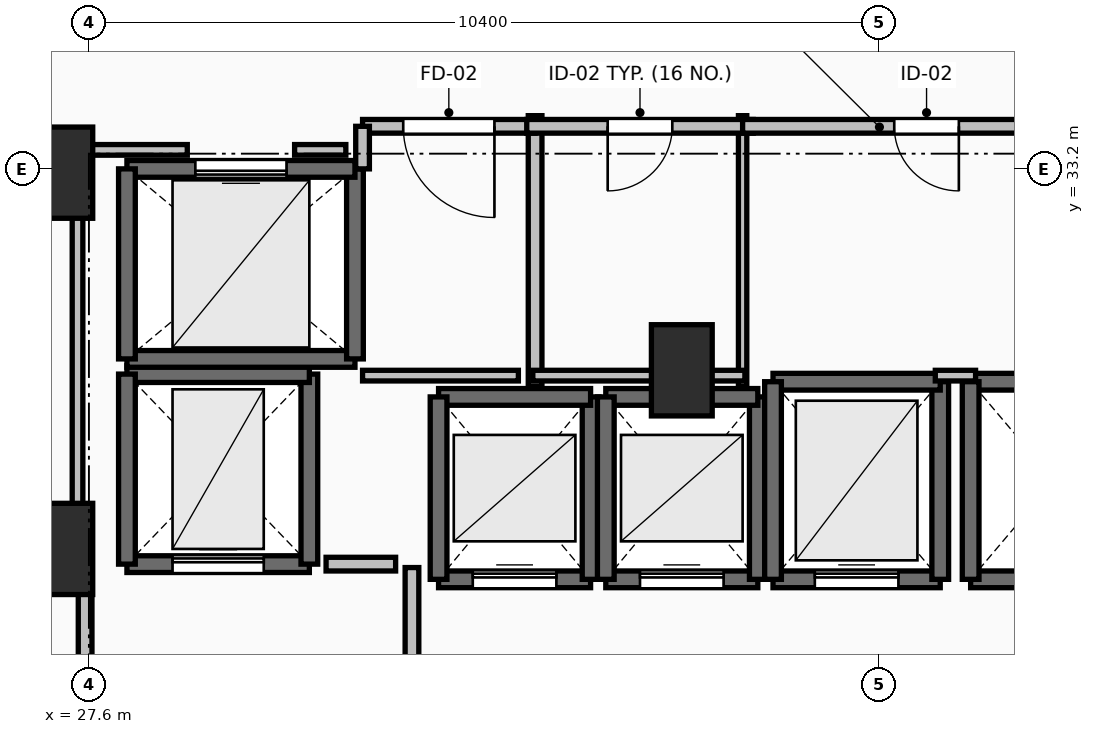
"""IFC4 building model, lengths in metres.
Left out: names, types, materials, properties, quantities, classifications, styles, units other than length and angle.
Written with IfcOpenShell. Run it as: python <this file> out.ifc"""

import sys

from ifc_helpers import new_model, si_unit, direction, frame, frame_2d, origin, origin_2d, place, context, subcontext, project, spatial, rectangle, extrude, element, fill, save


model = new_model("IFC4")
c1 = context("Model", 3, precision=1e-05, world=origin(), true_north=direction((0.0, 1.0)))
c2 = subcontext(c1, "Body", "Model", "MODEL_VIEW")
j1 = project(units=[si_unit("LENGTHUNIT", "METRE"), si_unit("PLANEANGLEUNIT", "RADIAN")], contexts=[c1])
p1 = place(None, origin())
s1 = spatial("IfcSite", under=j1, at=p1, CompositionType="ELEMENT")
p2 = place(p1, origin())
s2 = spatial("IfcBuilding", under=s1, at=p2, CompositionType="ELEMENT")
p3 = place(p2, frame((0.0, 0.0, 89.3)))
s3 = spatial("IfcBuildingStorey", under=s2, at=p3, CompositionType="ELEMENT", Elevation=89.3)
for number, where, z_axis, x_axis in (
    (1, (27.25, 28.2, 0.0), (0.0, 0.0, 1.0), (1.0, 0.0, 0.0)),
    (2, (27.25, 33.15, 0.0), (0.0, 0.0, 1.0), (1.0, 0.0, 0.0)),
    (3, (35.4, 30.55, 0.0), (0.0, 0.0, 1.0), (1.0, 0.0, 0.0)),
):
    element("IfcColumn", number, at=place(p3, frame(where, z_axis=z_axis, x_axis=x_axis)), inside=s3, PredefinedType="PILASTER", context=c2, shape_type="SweptSolid", body=[
        extrude(rectangle(XDim=0.8, YDim=1.2, at=origin_2d()), origin(), (0.0, 0.0, 1.0), 3.5),
    ])
p4 = place(p3, frame((32.2, 27.8, 0.0), z_axis=(0.0, 0.0, 1.0), x_axis=(1.0, 0.0, 0.0)))
e4 = element("IfcWall", 4, at=p4, inside=s3, PredefinedType="SOLIDWALL", context=c2, shape_type="SweptSolid", body=[
    extrude(rectangle(XDim=2.0, YDim=0.22, at=frame_2d((1.0, 0.0))), origin(), (0.0, 0.0, 1.0), 3.24),
])
p5 = place(p4, frame((0.45, 0.0, 0.0)))
e5 = element("IfcOpeningElement", 5, at=p5, cuts=e4, PredefinedType="OPENING", context=c2, shape_type="SweptSolid", body=[
    extrude(rectangle(XDim=1.1, YDim=2.2, at=frame_2d((0.55, 1.1))), frame((0.0, 0.125, 0.0), z_axis=(0.0, -1.0, 0.0), x_axis=(1.0, 0.0, 0.0)), (0.0, 0.0, 1.0), 0.25),
])
p6 = place(p3, frame((34.2, 27.8, 0.0), z_axis=(0.0, 0.0, 1.0), x_axis=(0.0, 1.0, 0.0)))
e6 = element("IfcWall", 6, at=p6, inside=s3, PredefinedType="SOLIDWALL", context=c2, shape_type="SweptSolid", body=[
    extrude(rectangle(XDim=2.4, YDim=0.22, at=frame_2d((1.2, 0.0))), origin(), (0.0, 0.0, 1.0), 3.24),
])
p7 = place(p3, frame((34.2, 30.2, 0.0), z_axis=(0.0, 0.0, 1.0), x_axis=(-1.0, 0.0, 0.0)))
e7 = element("IfcWall", 7, at=p7, inside=s3, PredefinedType="SOLIDWALL", context=c2, shape_type="SweptSolid", body=[
    extrude(rectangle(XDim=2.0, YDim=0.22, at=frame_2d((1.0, 0.0))), origin(), (0.0, 0.0, 1.0), 3.24),
])
p8 = place(p3, frame((32.2, 30.2, 0.0), z_axis=(0.0, 0.0, 1.0), x_axis=(0.0, -1.0, 0.0)))
e8 = element("IfcWall", 8, at=p8, inside=s3, PredefinedType="SOLIDWALL", context=c2, shape_type="SweptSolid", body=[
    extrude(rectangle(XDim=2.4, YDim=0.22, at=frame_2d((1.2, 0.0))), origin(), (0.0, 0.0, 1.0), 3.24),
])
p9 = place(p3, frame((34.4, 27.8, 0.0), z_axis=(0.0, 0.0, 1.0), x_axis=(1.0, 0.0, 0.0)))
e9 = element("IfcWall", 9, at=p9, inside=s3, PredefinedType="SOLIDWALL", context=c2, shape_type="SweptSolid", body=[
    extrude(rectangle(XDim=2.0, YDim=0.22, at=frame_2d((1.0, 0.0))), origin(), (0.0, 0.0, 1.0), 3.24),
])
p10 = place(p9, frame((0.45, 0.0, 0.0)))
e10 = element("IfcOpeningElement", 10, at=p10, cuts=e9, PredefinedType="OPENING", context=c2, shape_type="SweptSolid", body=[
    extrude(rectangle(XDim=1.1, YDim=2.2, at=frame_2d((0.55, 1.1))), frame((0.0, 0.125, 0.0), z_axis=(0.0, -1.0, 0.0), x_axis=(1.0, 0.0, 0.0)), (0.0, 0.0, 1.0), 0.25),
])
p11 = place(p3, frame((36.4, 27.8, 0.0), z_axis=(0.0, 0.0, 1.0), x_axis=(0.0, 1.0, 0.0)))
e11 = element("IfcWall", 11, at=p11, inside=s3, PredefinedType="SOLIDWALL", context=c2, shape_type="SweptSolid", body=[
    extrude(rectangle(XDim=2.4, YDim=0.22, at=frame_2d((1.2, 0.0))), origin(), (0.0, 0.0, 1.0), 3.24),
])
p12 = place(p3, frame((36.4, 30.2, 0.0), z_axis=(0.0, 0.0, 1.0), x_axis=(-1.0, 0.0, 0.0)))
e12 = element("IfcWall", 12, at=p12, inside=s3, PredefinedType="SOLIDWALL", context=c2, shape_type="SweptSolid", body=[
    extrude(rectangle(XDim=2.0, YDim=0.22, at=frame_2d((1.0, 0.0))), origin(), (0.0, 0.0, 1.0), 3.24),
])
p13 = place(p3, frame((34.4, 30.2, 0.0), z_axis=(0.0, 0.0, 1.0), x_axis=(0.0, -1.0, 0.0)))
e13 = element("IfcWall", 13, at=p13, inside=s3, PredefinedType="SOLIDWALL", context=c2, shape_type="SweptSolid", body=[
    extrude(rectangle(XDim=2.4, YDim=0.22, at=frame_2d((1.2, 0.0))), origin(), (0.0, 0.0, 1.0), 3.24),
])
p14 = place(p3, frame((36.6, 27.8, 0.0), z_axis=(0.0, 0.0, 1.0), x_axis=(1.0, 0.0, 0.0)))
e14 = element("IfcWall", 14, at=p14, inside=s3, PredefinedType="SOLIDWALL", context=c2, shape_type="SweptSolid", body=[
    extrude(rectangle(XDim=2.2, YDim=0.22, at=frame_2d((1.1, 0.0))), origin(), (0.0, 0.0, 1.0), 3.24),
])
p15 = place(p14, frame((0.55, 0.0, 0.0)))
e15 = element("IfcOpeningElement", 15, at=p15, cuts=e14, PredefinedType="OPENING", context=c2, shape_type="SweptSolid", body=[
    extrude(rectangle(XDim=1.1, YDim=2.2, at=frame_2d((0.55, 1.1))), frame((0.0, 0.125, 0.0), z_axis=(0.0, -1.0, 0.0), x_axis=(1.0, 0.0, 0.0)), (0.0, 0.0, 1.0), 0.25),
])
p16 = place(p3, frame((38.8, 27.8, 0.0), z_axis=(0.0, 0.0, 1.0), x_axis=(0.0, 1.0, 0.0)))
e16 = element("IfcWall", 16, at=p16, inside=s3, PredefinedType="SOLIDWALL", context=c2, shape_type="SweptSolid", body=[
    extrude(rectangle(XDim=2.6, YDim=0.22, at=frame_2d((1.3, 0.0))), origin(), (0.0, 0.0, 1.0), 3.24),
])
p17 = place(p3, frame((38.8, 30.4, 0.0), z_axis=(0.0, 0.0, 1.0), x_axis=(-1.0, 0.0, 0.0)))
e17 = element("IfcWall", 17, at=p17, inside=s3, PredefinedType="SOLIDWALL", context=c2, shape_type="SweptSolid", body=[
    extrude(rectangle(XDim=2.2, YDim=0.22, at=frame_2d((1.1, 0.0))), origin(), (0.0, 0.0, 1.0), 3.24),
])
p18 = place(p3, frame((36.6, 30.4, 0.0), z_axis=(0.0, 0.0, 1.0), x_axis=(0.0, -1.0, 0.0)))
e18 = element("IfcWall", 18, at=p18, inside=s3, PredefinedType="SOLIDWALL", context=c2, shape_type="SweptSolid", body=[
    extrude(rectangle(XDim=2.6, YDim=0.22, at=frame_2d((1.3, 0.0))), origin(), (0.0, 0.0, 1.0), 3.24),
])
for number, where, z_axis, x_axis in (
    (19, (39.2, 27.8, 0.0), (0.0, 0.0, 1.0), (1.0, 0.0, 0.0)),
    (20, (41.4, 30.4, 0.0), (0.0, 0.0, 1.0), (-1.0, 0.0, 0.0)),
):
    element("IfcWall", number, at=place(p3, frame(where, z_axis=z_axis, x_axis=x_axis)), inside=s3, PredefinedType="SOLIDWALL", context=c2, shape_type="SweptSolid", body=[
        extrude(rectangle(XDim=2.2, YDim=0.22, at=frame_2d((1.1, 0.0))), origin(), (0.0, 0.0, 1.0), 3.24),
    ])
p19 = place(p3, frame((39.2, 30.4, 0.0), z_axis=(0.0, 0.0, 1.0), x_axis=(0.0, -1.0, 0.0)))
e21 = element("IfcWall", 21, at=p19, inside=s3, PredefinedType="SOLIDWALL", context=c2, shape_type="SweptSolid", body=[
    extrude(rectangle(XDim=2.6, YDim=0.22, at=frame_2d((1.3, 0.0))), origin(), (0.0, 0.0, 1.0), 3.24),
])
p20 = place(p3, frame((28.1, 28.0, 0.0), z_axis=(0.0, 0.0, 1.0), x_axis=(1.0, 0.0, 0.0)))
e22 = element("IfcWall", 22, at=p20, inside=s3, PredefinedType="SHEAR", context=c2, shape_type="SweptSolid", body=[
    extrude(rectangle(XDim=2.4, YDim=0.22, at=frame_2d((1.2, 0.0))), origin(), (0.0, 0.0, 1.0), 3.24),
])
p21 = place(p20, frame((0.6, 0.0, 0.0)))
e23 = element("IfcOpeningElement", 23, at=p21, cuts=e22, PredefinedType="OPENING", context=c2, shape_type="SweptSolid", body=[
    extrude(rectangle(XDim=1.2, YDim=2.2, at=frame_2d((0.6, 1.1))), frame((0.0, 0.125, 0.0), z_axis=(0.0, -1.0, 0.0), x_axis=(1.0, 0.0, 0.0)), (0.0, 0.0, 1.0), 0.25),
])
p22 = place(p3, frame((30.5, 28.0, 0.0), z_axis=(0.0, 0.0, 1.0), x_axis=(0.0, 1.0, 0.0)))
e24 = element("IfcWall", 24, at=p22, inside=s3, PredefinedType="SHEAR", context=c2, shape_type="SweptSolid", body=[
    extrude(rectangle(XDim=2.5, YDim=0.22, at=frame_2d((1.25, 0.0))), origin(), (0.0, 0.0, 1.0), 3.24),
])
p23 = place(p3, frame((30.5, 30.5, 0.0), z_axis=(0.0, 0.0, 1.0), x_axis=(-1.0, 0.0, 0.0)))
e25 = element("IfcWall", 25, at=p23, inside=s3, PredefinedType="SHEAR", context=c2, shape_type="SweptSolid", body=[
    extrude(rectangle(XDim=2.4, YDim=0.22, at=frame_2d((1.2, 0.0))), origin(), (0.0, 0.0, 1.0), 3.24),
])
p24 = place(p3, frame((28.1, 30.5, 0.0), z_axis=(0.0, 0.0, 1.0), x_axis=(0.0, -1.0, 0.0)))
e26 = element("IfcWall", 26, at=p24, inside=s3, PredefinedType="SHEAR", context=c2, shape_type="SweptSolid", body=[
    extrude(rectangle(XDim=2.5, YDim=0.22, at=frame_2d((1.25, 0.0))), origin(), (0.0, 0.0, 1.0), 3.24),
])
p25 = place(p3, frame((28.1, 30.7, 0.0), z_axis=(0.0, 0.0, 1.0), x_axis=(1.0, 0.0, 0.0)))
e27 = element("IfcWall", 27, at=p25, inside=s3, PredefinedType="SOLIDWALL", context=c2, shape_type="SweptSolid", body=[
    extrude(rectangle(XDim=3.0, YDim=0.22, at=frame_2d((1.5, 0.0))), origin(), (0.0, 0.0, 1.0), 3.24),
])
p26 = place(p3, frame((31.1, 30.7, 0.0), z_axis=(0.0, 0.0, 1.0), x_axis=(0.0, 1.0, 0.0)))
e28 = element("IfcWall", 28, at=p26, inside=s3, PredefinedType="SOLIDWALL", context=c2, shape_type="SweptSolid", body=[
    extrude(rectangle(XDim=2.5, YDim=0.22, at=frame_2d((1.25, 0.0))), origin(), (0.0, 0.0, 1.0), 3.24),
])
p27 = place(p3, frame((31.1, 33.2, 0.0), z_axis=(0.0, 0.0, 1.0), x_axis=(-1.0, 0.0, 0.0)))
e29 = element("IfcWall", 29, at=p27, inside=s3, PredefinedType="SOLIDWALL", context=c2, shape_type="SweptSolid", body=[
    extrude(rectangle(XDim=3.0, YDim=0.22, at=frame_2d((1.5, 0.0))), origin(), (0.0, 0.0, 1.0), 3.24),
])
p28 = place(p27, frame((0.9, 0.0, 0.0)))
e30 = element("IfcOpeningElement", 30, at=p28, cuts=e29, PredefinedType="OPENING", context=c2, shape_type="SweptSolid", body=[
    extrude(rectangle(XDim=1.2, YDim=2.2, at=frame_2d((0.6, 1.1))), frame((0.0, 0.125, 0.0), z_axis=(0.0, -1.0, 0.0), x_axis=(1.0, 0.0, 0.0)), (0.0, 0.0, 1.0), 0.25),
])
p29 = place(p3, frame((28.1, 33.2, 0.0), z_axis=(0.0, 0.0, 1.0), x_axis=(0.0, -1.0, 0.0)))
e31 = element("IfcWall", 31, at=p29, inside=s3, PredefinedType="SOLIDWALL", context=c2, shape_type="SweptSolid", body=[
    extrude(rectangle(XDim=2.5, YDim=0.22, at=frame_2d((1.25, 0.0))), origin(), (0.0, 0.0, 1.0), 3.24),
])
p30 = place(p3, frame((31.85, 24.045, 0.0), z_axis=(0.0, 0.0, 1.0), x_axis=(0.0, 1.0, 0.0)))
e32 = element("IfcWall", 32, at=p30, inside=s3, PredefinedType="PARTITIONING", context=c2, shape_type="SweptSolid", body=[
    extrude(rectangle(XDim=3.91, YDim=0.18, at=frame_2d((1.955, 0.0))), origin(), (0.0, 0.0, 1.0), 3.24),
])
p31 = place(p30, frame((1.355, 0.0, 0.0)))
e33 = element("IfcOpeningElement", 33, at=p31, cuts=e32, PredefinedType="OPENING", context=c2, shape_type="SweptSolid", body=[
    extrude(rectangle(XDim=1.2, YDim=2.15, at=frame_2d((0.6, 1.075))), frame((0.0, 0.105, 0.0), z_axis=(0.0, -1.0, 0.0), x_axis=(1.0, 0.0, 0.0)), (0.0, 0.0, 1.0), 0.21),
])
p32 = place(p3, frame((27.55, 28.0, 0.0), z_axis=(0.0, 0.0, 1.0), x_axis=(0.0, -1.0, 0.0)))
e34 = element("IfcWall", 34, at=p32, inside=s3, PredefinedType="PARTITIONING", context=c2, shape_type="SweptSolid", body=[
    extrude(rectangle(XDim=4.05, YDim=0.18, at=frame_2d((2.025, 0.0))), origin(), (0.0, 0.0, 1.0), 3.24),
])
p33 = place(p32, frame((1.425, 0.0, 0.0)))
e35 = element("IfcOpeningElement", 35, at=p33, cuts=e34, PredefinedType="OPENING", context=c2, shape_type="SweptSolid", body=[
    extrude(rectangle(XDim=1.2, YDim=2.15, at=frame_2d((0.6, 1.075))), frame((0.0, 0.105, 0.0), z_axis=(0.0, -1.0, 0.0), x_axis=(1.0, 0.0, 0.0)), (0.0, 0.0, 1.0), 0.21),
])
p34 = place(p3, frame((33.47, 30.34, 0.0), z_axis=(0.0, 0.0, 1.0), x_axis=(0.0, 1.0, 0.0)))
e36 = element("IfcWall", 36, at=p34, inside=s3, PredefinedType="PARTITIONING", context=c2, shape_type="SweptSolid", body=[
    extrude(rectangle(XDim=3.56, YDim=0.18, at=frame_2d((1.78, 0.0))), origin(), (0.0, 0.0, 1.0), 3.24),
])
p35 = place(p3, frame((33.47, 33.76, 0.0), z_axis=(0.0, 0.0, 1.0), x_axis=(-1.0, 0.0, 0.0)))
e37 = element("IfcWall", 37, at=p35, inside=s3, PredefinedType="PARTITIONING", context=c2, shape_type="SweptSolid", body=[
    extrude(rectangle(XDim=2.27, YDim=0.18, at=frame_2d((1.135, 0.0))), origin(), (0.0, 0.0, 1.0), 3.24),
])
p36 = place(p35, frame((0.535, 0.0, 0.0)))
e38 = element("IfcOpeningElement", 38, at=p36, cuts=e37, PredefinedType="OPENING", context=c2, shape_type="SweptSolid", body=[
    extrude(rectangle(XDim=1.2, YDim=2.15, at=frame_2d((0.6, 1.075))), frame((0.0, 0.105, 0.0), z_axis=(0.0, -1.0, 0.0), x_axis=(1.0, 0.0, 0.0)), (0.0, 0.0, 1.0), 0.21),
])
p37 = place(p3, frame((31.2, 33.76, 0.0), z_axis=(0.0, 0.0, 1.0), x_axis=(0.0, -1.0, 0.0)))
e39 = element("IfcWall", 39, at=p37, inside=s3, PredefinedType="PARTITIONING", context=c2, shape_type="SweptSolid", body=[
    extrude(rectangle(XDim=0.56, YDim=0.18, at=frame_2d((0.28, 0.0))), origin(), (0.0, 0.0, 1.0), 3.24),
])
p38 = place(p3, frame((36.2, 30.34, 0.0), z_axis=(0.0, 0.0, 1.0), x_axis=(0.0, 1.0, 0.0)))
e40 = element("IfcWall", 40, at=p38, inside=s3, PredefinedType="PARTITIONING", context=c2, shape_type="SweptSolid", body=[
    extrude(rectangle(XDim=3.56, YDim=0.11, at=frame_2d((1.78, 0.0))), origin(), (0.0, 0.0, 1.0), 2.432),
])
p39 = place(p3, frame((36.34, 33.76, 0.0), z_axis=(0.0, 0.0, 1.0), x_axis=(-1.0, 0.0, 0.0)))
e41 = element("IfcWall", 41, at=p39, inside=s3, PredefinedType="PARTITIONING", context=c2, shape_type="SweptSolid", body=[
    extrude(rectangle(XDim=2.98, YDim=0.18, at=frame_2d((1.49, 0.0))), origin(), (0.0, 0.0, 1.0), 3.24),
])
p40 = place(p39, frame((1.065, 0.0, 0.0)))
e42 = element("IfcOpeningElement", 42, at=p40, cuts=e41, PredefinedType="OPENING", context=c2, shape_type="SweptSolid", body=[
    extrude(rectangle(XDim=0.85, YDim=2.1, at=frame_2d((0.425, 1.05))), frame((0.0, 0.105, 0.0), z_axis=(0.0, -1.0, 0.0), x_axis=(1.0, 0.0, 0.0)), (0.0, 0.0, 1.0), 0.21),
])
p41 = place(p3, frame((41.04, 33.76, 0.0), z_axis=(0.0, 0.0, 1.0), x_axis=(-1.0, 0.0, 0.0)))
e43 = element("IfcWall", 43, at=p41, inside=s3, PredefinedType="PARTITIONING", context=c2, shape_type="SweptSolid", body=[
    extrude(rectangle(XDim=4.84, YDim=0.18, at=frame_2d((2.42, 0.0))), origin(), (0.0, 0.0, 1.0), 3.24),
])
p42 = place(p41, frame((1.995, 0.0, 0.0)))
e44 = element("IfcOpeningElement", 44, at=p42, cuts=e43, PredefinedType="OPENING", context=c2, shape_type="SweptSolid", body=[
    extrude(rectangle(XDim=0.85, YDim=2.1, at=frame_2d((0.425, 1.05))), frame((0.0, 0.105, 0.0), z_axis=(0.0, -1.0, 0.0), x_axis=(1.0, 0.0, 0.0)), (0.0, 0.0, 1.0), 0.21),
])
p43 = place(p3, frame((31.635, 28.0, 0.0), z_axis=(0.0, 0.0, 1.0), x_axis=(-1.0, 0.0, 0.0)))
e45 = element("IfcWall", 45, at=p43, inside=s3, PredefinedType="PARTITIONING", context=c2, shape_type="SweptSolid", body=[
    extrude(rectangle(XDim=0.915, YDim=0.18, at=frame_2d((0.458, 0.0))), origin(), (0.0, 0.0, 1.0), 3.24),
])
p44 = place(p3, frame((31.2, 30.48, 0.0), z_axis=(0.0, 0.0, 1.0), x_axis=(1.0, 0.0, 0.0)))
e46 = element("IfcWall", 46, at=p44, inside=s3, PredefinedType="PARTITIONING", context=c2, shape_type="SweptSolid", body=[
    extrude(rectangle(XDim=2.05, YDim=0.14, at=frame_2d((1.025, 0.0))), origin(), (0.0, 0.0, 1.0), 3.24),
])
p45 = place(p3, frame((33.44, 30.48, 0.0), z_axis=(0.0, 0.0, 1.0), x_axis=(1.0, 0.0, 0.0)))
e47 = element("IfcWall", 47, at=p45, inside=s3, PredefinedType="PARTITIONING", context=c2, shape_type="SweptSolid", body=[
    extrude(rectangle(XDim=2.79, YDim=0.14, at=frame_2d((1.395, 0.0))), origin(), (0.0, 0.0, 1.0), 2.432),
])
p46 = place(p3, frame((38.735, 30.48, 0.0), z_axis=(0.0, 0.0, 1.0), x_axis=(1.0, 0.0, 0.0)))
e48 = element("IfcWall", 48, at=p46, inside=s3, PredefinedType="PARTITIONING", context=c2, shape_type="SweptSolid", body=[
    extrude(rectangle(XDim=0.53, YDim=0.14, at=frame_2d((0.265, 0.0))), origin(), (0.0, 0.0, 1.0), 2.432),
])
p47 = place(p3, frame((27.45, 28.196, 0.0), z_axis=(0.0, 0.0, 1.0), x_axis=(0.0, 1.0, 0.0)))
e49 = element("IfcWall", 49, at=p47, inside=s3, PredefinedType="PARTITIONING", context=c2, shape_type="SweptSolid", body=[
    extrude(rectangle(XDim=5.254, YDim=0.14, at=frame_2d((2.627, 0.0))), origin(), (0.0, 0.0, 1.0), 2.432),
])
p48 = place(p3, frame((27.45, 33.45, 0.0), z_axis=(0.0, 0.0, 1.0), x_axis=(1.0, 0.0, 0.0)))
e50 = element("IfcWall", 50, at=p48, inside=s3, PredefinedType="PARTITIONING", context=c2, shape_type="SweptSolid", body=[
    extrude(rectangle(XDim=1.444, YDim=0.14, at=frame_2d((0.722, 0.0))), origin(), (0.0, 0.0, 1.0), 2.432),
])
p49 = place(p3, frame((30.306, 33.45, 0.0), z_axis=(0.0, 0.0, 1.0), x_axis=(1.0, 0.0, 0.0)))
e51 = element("IfcWall", 51, at=p49, inside=s3, PredefinedType="PARTITIONING", context=c2, shape_type="SweptSolid", body=[
    extrude(rectangle(XDim=0.674, YDim=0.14, at=frame_2d((0.337, 0.0))), origin(), (0.0, 0.0, 1.0), 3.24),
])
p50 = place(p5, origin())
e52 = element("IfcDoor", 52, at=p50, inside=s3, OperationType="SLIDING_TO_LEFT", PredefinedType="DOOR", context=c2, shape_type="SweptSolid", body=[
    extrude(rectangle(XDim=1.1, YDim=2.2, at=frame_2d((0.55, 1.1))), frame((0.0, 0.025, 0.0), z_axis=(0.0, -1.0, 0.0), x_axis=(1.0, 0.0, 0.0)), (0.0, 0.0, 1.0), 0.05),
])
fill(e5, e52)
p51 = place(p10, origin())
e53 = element("IfcDoor", 53, at=p51, inside=s3, OperationType="SLIDING_TO_LEFT", PredefinedType="DOOR", context=c2, shape_type="SweptSolid", body=[
    extrude(rectangle(XDim=1.1, YDim=2.2, at=frame_2d((0.55, 1.1))), frame((0.0, 0.025, 0.0), z_axis=(0.0, -1.0, 0.0), x_axis=(1.0, 0.0, 0.0)), (0.0, 0.0, 1.0), 0.05),
])
fill(e10, e53)
p52 = place(p15, origin())
e54 = element("IfcDoor", 54, at=p52, inside=s3, OperationType="SLIDING_TO_LEFT", PredefinedType="DOOR", context=c2, shape_type="SweptSolid", body=[
    extrude(rectangle(XDim=1.1, YDim=2.2, at=frame_2d((0.55, 1.1))), frame((0.0, 0.025, 0.0), z_axis=(0.0, -1.0, 0.0), x_axis=(1.0, 0.0, 0.0)), (0.0, 0.0, 1.0), 0.05),
])
fill(e15, e54)
p53 = place(p21, origin())
e55 = element("IfcDoor", 55, at=p53, inside=s3, OperationType="SLIDING_TO_LEFT", PredefinedType="DOOR", context=c2, shape_type="SweptSolid", body=[
    extrude(rectangle(XDim=1.2, YDim=2.2, at=frame_2d((0.6, 1.1))), frame((0.0, 0.025, 0.0), z_axis=(0.0, -1.0, 0.0), x_axis=(1.0, 0.0, 0.0)), (0.0, 0.0, 1.0), 0.05),
])
fill(e23, e55)
p54 = place(p28, origin())
e56 = element("IfcDoor", 56, at=p54, inside=s3, OperationType="SLIDING_TO_LEFT", PredefinedType="DOOR", context=c2, shape_type="SweptSolid", body=[
    extrude(rectangle(XDim=1.2, YDim=2.2, at=frame_2d((0.6, 1.1))), frame((0.0, 0.025, 0.0), z_axis=(0.0, -1.0, 0.0), x_axis=(1.0, 0.0, 0.0)), (0.0, 0.0, 1.0), 0.05),
])
fill(e30, e56)
p55 = place(p36, origin())
e57 = element("IfcDoor", 57, at=p55, inside=s3, OperationType="SINGLE_SWING_LEFT", PredefinedType="DOOR", context=c2, shape_type="SweptSolid", body=[
    extrude(rectangle(XDim=1.2, YDim=2.15, at=frame_2d((0.6, 1.075))), frame((0.0, 0.025, 0.0), z_axis=(0.0, -1.0, 0.0), x_axis=(1.0, 0.0, 0.0)), (0.0, 0.0, 1.0), 0.05),
])
fill(e38, e57)
p56 = place(p40, origin())
e58 = element("IfcDoor", 58, at=p56, inside=s3, OperationType="SINGLE_SWING_RIGHT", PredefinedType="DOOR", context=c2, shape_type="SweptSolid", body=[
    extrude(rectangle(XDim=0.85, YDim=2.1, at=frame_2d((0.425, 1.05))), frame((0.0, 0.025, 0.0), z_axis=(0.0, -1.0, 0.0), x_axis=(1.0, 0.0, 0.0)), (0.0, 0.0, 1.0), 0.05),
])
fill(e42, e58)
p57 = place(p42, origin())
e59 = element("IfcDoor", 59, at=p57, inside=s3, OperationType="SINGLE_SWING_LEFT", PredefinedType="DOOR", context=c2, shape_type="SweptSolid", body=[
    extrude(rectangle(XDim=0.85, YDim=2.1, at=frame_2d((0.425, 1.05))), frame((0.0, 0.025, 0.0), z_axis=(0.0, -1.0, 0.0), x_axis=(1.0, 0.0, 0.0)), (0.0, 0.0, 1.0), 0.05),
])
fill(e44, e59)
save(model, sys.argv[1])
